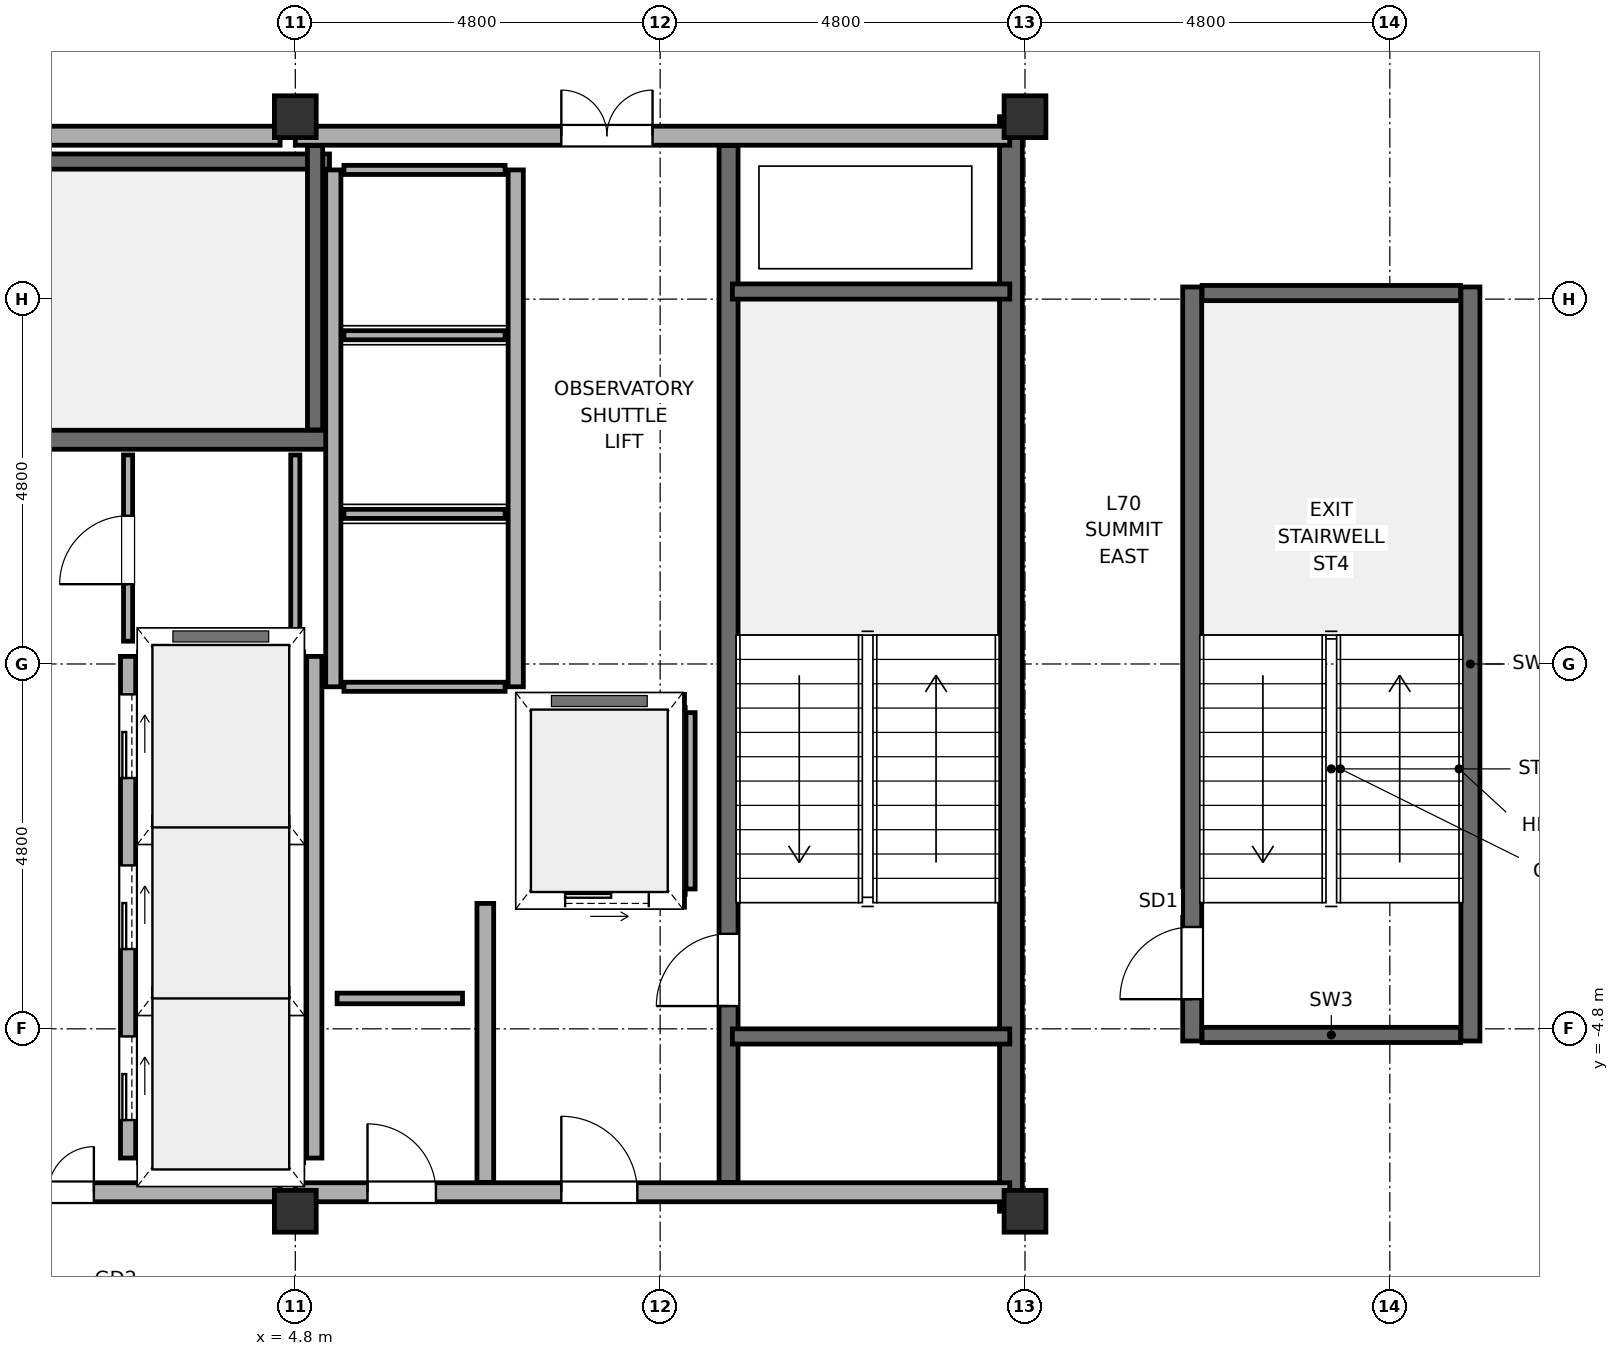
"""IFC4 building model, lengths in metres.
Left out: names, types, materials, properties, quantities, classifications, styles, units other than length and angle.
Written with IfcOpenShell. Run it as: python <this file> out.ifc"""

import sys

from ifc_helpers import new_model, si_unit, direction, frame, frame_2d, origin, origin_2d, place, context, subcontext, project, spatial, rectangle, hollow_rectangle, extrude, element, fill, save


model = new_model("IFC4")
c1 = context("Model", 3, precision=1e-05, world=origin(), true_north=direction((0.0, 1.0)))
c2 = subcontext(c1, "Body", "Model", "MODEL_VIEW")
j1 = project(units=[si_unit("LENGTHUNIT", "METRE"), si_unit("PLANEANGLEUNIT", "RADIAN")], contexts=[c1])
p1 = place(None, origin())
s1 = spatial("IfcSite", under=j1, at=p1, CompositionType="ELEMENT")
p2 = place(p1, origin())
s2 = spatial("IfcBuilding", under=s1, at=p2, CompositionType="ELEMENT")
p3 = place(p2, frame((0.0, 0.0, 282.2)))
s3 = spatial("IfcBuildingStorey", under=s2, at=p3, CompositionType="ELEMENT", Elevation=282.2)
for number, where, z_axis, x_axis in (
    (1, (4.8, -7.2, 0.0), (0.0, 0.0, 1.0), (1.0, 0.0, 0.0)),
    (2, (4.8, 7.2, 0.0), (0.0, 0.0, 1.0), (1.0, 0.0, 0.0)),
    (3, (14.4, -7.2, 0.0), (0.0, 0.0, 1.0), (1.0, 0.0, 0.0)),
    (4, (14.4, 7.2, 0.0), (0.0, 0.0, 1.0), (1.0, 0.0, 0.0)),
):
    element("IfcColumn", number, at=place(p3, frame(where, z_axis=z_axis, x_axis=x_axis)), inside=s3, PredefinedType="COLUMN", context=c2, shape_type="SweptSolid", body=[
        extrude(hollow_rectangle(XDim=0.55, YDim=0.55, WallThickness=0.025, at=origin_2d()), origin(), (0.0, 0.0, 1.0), 4.2),
    ])
p4 = place(p3, frame((14.215, -7.2, -0.2), z_axis=(0.0, 0.0, 1.0), x_axis=(0.0, 1.0, 0.0)))
e5 = element("IfcWall", 5, at=p4, inside=s3, PredefinedType="SHEAR", context=c2, shape_type="SweptSolid", body=[
    extrude(rectangle(XDim=14.4, YDim=0.3, at=frame_2d((7.2, 0.0))), origin(), (0.0, 0.0, 1.0), 4.2),
])
p5 = place(p3, frame((-4.6, -6.95, 0.0), z_axis=(0.0, 0.0, 1.0), x_axis=(1.0, 0.0, 0.0)))
e6 = element("IfcWall", 6, at=p5, inside=s3, PredefinedType="SOLIDWALL", context=c2, shape_type="SweptSolid", body=[
    extrude(rectangle(XDim=9.2, YDim=0.25, at=frame_2d((4.6, 0.0))), origin(), (0.0, 0.0, 1.0), 2.8),
])
p6 = place(p5, frame((0.8, 0.0, 0.0)))
e7 = element("IfcOpeningElement", 7, at=p6, cuts=e6, PredefinedType="OPENING", context=c2, shape_type="SweptSolid", body=[
    extrude(rectangle(XDim=1.2, YDim=2.2, at=frame_2d((0.6, 1.1))), frame((0.0, 0.14, 0.0), z_axis=(0.0, -1.0, 0.0), x_axis=(1.0, 0.0, 0.0)), (0.0, 0.0, 1.0), 0.28),
])
p7 = place(p5, frame((5.55, 0.0, 0.0)))
e8 = element("IfcOpeningElement", 8, at=p7, cuts=e6, PredefinedType="OPENING", context=c2, shape_type="SweptSolid", body=[
    extrude(rectangle(XDim=1.2, YDim=2.2, at=frame_2d((0.6, 1.1))), frame((0.0, 0.14, 0.0), z_axis=(0.0, -1.0, 0.0), x_axis=(1.0, 0.0, 0.0)), (0.0, 0.0, 1.0), 0.28),
])
p8 = place(p3, frame((4.8, -6.95, 0.0), z_axis=(0.0, 0.0, 1.0), x_axis=(1.0, 0.0, 0.0)))
e9 = element("IfcWall", 9, at=p8, inside=s3, PredefinedType="SOLIDWALL", context=c2, shape_type="SweptSolid", body=[
    extrude(rectangle(XDim=9.4, YDim=0.25, at=frame_2d((4.7, 0.0))), origin(), (0.0, 0.0, 1.0), 2.6),
])
p9 = place(p8, frame((3.5, 0.0, 0.0)))
e10 = element("IfcOpeningElement", 10, at=p9, cuts=e9, PredefinedType="OPENING", context=c2, shape_type="SweptSolid", body=[
    extrude(rectangle(XDim=1.0, YDim=2.15, at=frame_2d((0.5, 1.075))), frame((0.0, 0.14, 0.0), z_axis=(0.0, -1.0, 0.0), x_axis=(1.0, 0.0, 0.0)), (0.0, 0.0, 1.0), 0.28),
])
p10 = place(p8, frame((0.95, 0.0, 0.0)))
e11 = element("IfcOpeningElement", 11, at=p10, cuts=e9, PredefinedType="OPENING", context=c2, shape_type="SweptSolid", body=[
    extrude(rectangle(XDim=0.9, YDim=2.1, at=frame_2d((0.45, 1.05))), frame((0.0, 0.14, 0.0), z_axis=(0.0, -1.0, 0.0), x_axis=(1.0, 0.0, 0.0)), (0.0, 0.0, 1.0), 0.28),
])
p11 = place(p3, frame((-4.6, 6.95, 0.0), z_axis=(0.0, 0.0, 1.0), x_axis=(1.0, 0.0, 0.0)))
e12 = element("IfcWall", 12, at=p11, inside=s3, PredefinedType="SOLIDWALL", context=c2, shape_type="SweptSolid", body=[
    extrude(rectangle(XDim=9.2, YDim=0.25, at=frame_2d((4.6, 0.0))), origin(), (0.0, 0.0, 1.0), 2.6),
])
p12 = place(p3, frame((4.8, 6.95, 0.0), z_axis=(0.0, 0.0, 1.0), x_axis=(1.0, 0.0, 0.0)))
e13 = element("IfcWall", 13, at=p12, inside=s3, PredefinedType="SOLIDWALL", context=c2, shape_type="SweptSolid", body=[
    extrude(rectangle(XDim=9.4, YDim=0.25, at=frame_2d((4.7, 0.0))), origin(), (0.0, 0.0, 1.0), 2.6),
])
p13 = place(p12, frame((3.5, 0.0, 0.0)))
e14 = element("IfcOpeningElement", 14, at=p13, cuts=e13, PredefinedType="OPENING", context=c2, shape_type="SweptSolid", body=[
    extrude(rectangle(XDim=1.2, YDim=2.2, at=frame_2d((0.6, 1.1))), frame((0.0, 0.14, 0.0), z_axis=(0.0, -1.0, 0.0), x_axis=(1.0, 0.0, 0.0)), (0.0, 0.0, 1.0), 0.28),
])
p14 = place(p3, frame((7.3, -6.82, 0.0), z_axis=(0.0, 0.0, 1.0), x_axis=(0.0, 1.0, 0.0)))
e15 = element("IfcWall", 15, at=p14, inside=s3, PredefinedType="SOLIDWALL", context=c2, shape_type="SweptSolid", body=[
    extrude(rectangle(XDim=3.67, YDim=0.22, at=frame_2d((1.835, 0.0))), origin(), (0.0, 0.0, 1.0), 2.6),
])
p15 = place(p3, frame((10.5, -6.82, -0.2), z_axis=(0.0, 0.0, 1.0), x_axis=(0.0, 1.0, 0.0)))
e16 = element("IfcWall", 16, at=p15, inside=s3, PredefinedType="SOLIDWALL", context=c2, shape_type="SweptSolid", body=[
    extrude(rectangle(XDim=13.64, YDim=0.25, at=frame_2d((6.82, 0.0))), origin(), (0.0, 0.0, 1.0), 4.2),
])
p16 = place(p15, frame((2.32, 0.0, 0.2)))
e17 = element("IfcOpeningElement", 17, at=p16, cuts=e16, PredefinedType="OPENING", context=c2, shape_type="SweptSolid", body=[
    extrude(rectangle(XDim=0.95, YDim=2.15, at=frame_2d((0.475, 1.075))), frame((0.0, 0.14, 0.0), z_axis=(0.0, -1.0, 0.0), x_axis=(1.0, 0.0, 0.0)), (0.0, 0.0, 1.0), 0.28),
])
for number, where, z_axis, x_axis in (
    (18, (10.55, -4.9, -0.2), (0.0, 0.0, 1.0), (1.0, 0.0, 0.0)),
    (19, (10.55, 4.9, -0.2), (0.0, 0.0, 1.0), (1.0, 0.0, 0.0)),
):
    element("IfcWall", number, at=place(p3, frame(where, z_axis=z_axis, x_axis=x_axis)), inside=s3, PredefinedType="SOLIDWALL", context=c2, shape_type="SweptSolid", body=[
        extrude(rectangle(XDim=3.65, YDim=0.2, at=frame_2d((1.825, 0.0))), origin(), (0.0, 0.0, 1.0), 4.2),
    ])
p17 = place(p3, frame((-4.65, 2.95, -0.2), z_axis=(0.0, 0.0, 1.0), x_axis=(1.0, 0.0, 0.0)))
e20 = element("IfcWall", 20, at=p17, inside=s3, PredefinedType="SOLIDWALL", context=c2, shape_type="SweptSolid", body=[
    extrude(rectangle(XDim=9.9, YDim=0.25, at=frame_2d((4.95, 0.0))), origin(), (0.0, 0.0, 1.0), 4.2),
])
p18 = place(p17, frame((0.65, 0.0, 0.2)))
e21 = element("IfcOpeningElement", 21, at=p18, cuts=e20, PredefinedType="OPENING", context=c2, shape_type="SweptSolid", body=[
    extrude(rectangle(XDim=0.95, YDim=2.15, at=frame_2d((0.475, 1.075))), frame((0.0, 0.14, 0.0), z_axis=(0.0, -1.0, 0.0), x_axis=(1.0, 0.0, 0.0)), (0.0, 0.0, 1.0), 0.28),
])
p19 = place(p3, frame((-4.65, 6.61, -0.2), z_axis=(0.0, 0.0, 1.0), x_axis=(1.0, 0.0, 0.0)))
e22 = element("IfcWall", 22, at=p19, inside=s3, PredefinedType="SOLIDWALL", context=c2, shape_type="SweptSolid", body=[
    extrude(rectangle(XDim=9.9, YDim=0.2, at=frame_2d((4.95, 0.0))), origin(), (0.0, 0.0, 1.0), 4.2),
])
p20 = place(p3, frame((5.06, 3.08, -0.2), z_axis=(0.0, 0.0, 1.0), x_axis=(0.0, 1.0, 0.0)))
e23 = element("IfcWall", 23, at=p20, inside=s3, PredefinedType="SOLIDWALL", context=c2, shape_type="SweptSolid", body=[
    extrude(rectangle(XDim=3.74, YDim=0.2, at=frame_2d((1.87, 0.0))), origin(), (0.0, 0.0, 1.0), 4.2),
])
p21 = place(p3, frame((20.26, -4.96, -0.2), z_axis=(0.0, 0.0, 1.0), x_axis=(0.0, 1.0, 0.0)))
e24 = element("IfcWall", 24, at=p21, inside=s3, PredefinedType="SOLIDWALL", context=c2, shape_type="SweptSolid", body=[
    extrude(rectangle(XDim=9.92, YDim=0.25, at=frame_2d((4.96, 0.0))), origin(), (0.0, 0.0, 1.0), 4.2),
])
p22 = place(p3, frame((16.6, -4.96, -0.2), z_axis=(0.0, 0.0, 1.0), x_axis=(0.0, 1.0, 0.0)))
e25 = element("IfcWall", 25, at=p22, inside=s3, PredefinedType="SOLIDWALL", context=c2, shape_type="SweptSolid", body=[
    extrude(rectangle(XDim=9.92, YDim=0.25, at=frame_2d((4.96, 0.0))), origin(), (0.0, 0.0, 1.0), 4.2),
])
p23 = place(p22, frame((0.55, 0.0, 0.2)))
e26 = element("IfcOpeningElement", 26, at=p23, cuts=e25, PredefinedType="OPENING", context=c2, shape_type="SweptSolid", body=[
    extrude(rectangle(XDim=0.95, YDim=2.15, at=frame_2d((0.475, 1.075))), frame((0.0, 0.14, 0.0), z_axis=(0.0, -1.0, 0.0), x_axis=(1.0, 0.0, 0.0)), (0.0, 0.0, 1.0), 0.28),
])
for number, where, z_axis, x_axis in (
    (27, (16.73, -4.88, -0.2), (0.0, 0.0, 1.0), (1.0, 0.0, 0.0)),
    (28, (16.73, 4.88, -0.2), (0.0, 0.0, 1.0), (1.0, 0.0, 0.0)),
):
    element("IfcWall", number, at=place(p3, frame(where, z_axis=z_axis, x_axis=x_axis)), inside=s3, PredefinedType="SOLIDWALL", context=c2, shape_type="SweptSolid", body=[
        extrude(rectangle(XDim=3.4, YDim=0.2, at=frame_2d((1.7, 0.0))), origin(), (0.0, 0.0, 1.0), 4.2),
    ])
p24 = place(p3, frame((2.6, -6.5, 0.0), z_axis=(0.0, 0.0, 1.0), x_axis=(0.0, 1.0, 0.0)))
e29 = element("IfcWall", 29, at=p24, inside=s3, PredefinedType="SOLIDWALL", context=c2, shape_type="SweptSolid", body=[
    extrude(rectangle(XDim=6.6, YDim=0.2, at=frame_2d((3.3, 0.0))), origin(), (0.0, 0.0, 1.0), 4.0),
])
p25 = place(p24, frame((0.5, 0.0, 0.0)))
e30 = element("IfcOpeningElement", 30, at=p25, cuts=e29, PredefinedType="OPENING", context=c2, shape_type="SweptSolid", body=[
    extrude(rectangle(XDim=1.1, YDim=2.2, at=frame_2d((0.55, 1.1))), frame((0.0, 0.115, 0.0), z_axis=(0.0, -1.0, 0.0), x_axis=(1.0, 0.0, 0.0)), (0.0, 0.0, 1.0), 0.23),
])
p26 = place(p24, frame((2.75, 0.0, 0.0)))
e31 = element("IfcOpeningElement", 31, at=p26, cuts=e29, PredefinedType="OPENING", context=c2, shape_type="SweptSolid", body=[
    extrude(rectangle(XDim=1.1, YDim=2.2, at=frame_2d((0.55, 1.1))), frame((0.0, 0.115, 0.0), z_axis=(0.0, -1.0, 0.0), x_axis=(1.0, 0.0, 0.0)), (0.0, 0.0, 1.0), 0.23),
])
p27 = place(p24, frame((5.0, 0.0, 0.0)))
e32 = element("IfcOpeningElement", 32, at=p27, cuts=e29, PredefinedType="OPENING", context=c2, shape_type="SweptSolid", body=[
    extrude(rectangle(XDim=1.1, YDim=2.2, at=frame_2d((0.55, 1.1))), frame((0.0, 0.115, 0.0), z_axis=(0.0, -1.0, 0.0), x_axis=(1.0, 0.0, 0.0)), (0.0, 0.0, 1.0), 0.23),
])
p28 = place(p3, frame((5.05, -6.5, 0.0), z_axis=(0.0, 0.0, 1.0), x_axis=(0.0, 1.0, 0.0)))
e33 = element("IfcWall", 33, at=p28, inside=s3, PredefinedType="SOLIDWALL", context=c2, shape_type="SweptSolid", body=[
    extrude(rectangle(XDim=6.6, YDim=0.2, at=frame_2d((3.3, 0.0))), origin(), (0.0, 0.0, 1.0), 4.0),
])
for number, where, z_axis, x_axis in (
    (34, (2.74, -6.5, 0.0), (0.0, 0.0, 1.0), (1.0, 0.0, 0.0)),
    (35, (2.74, -4.325, 0.0), (0.0, 0.0, 1.0), (1.0, 0.0, 0.0)),
    (36, (2.74, -2.075, 0.0), (0.0, 0.0, 1.0), (1.0, 0.0, 0.0)),
    (37, (2.74, 0.1, 0.0), (0.0, 0.0, 1.0), (1.0, 0.0, 0.0)),
):
    element("IfcWall", number, at=place(p3, frame(where, z_axis=z_axis, x_axis=x_axis)), inside=s3, PredefinedType="PARTITIONING", context=c2, shape_type="SweptSolid", body=[
        extrude(rectangle(XDim=2.17, YDim=0.12, at=frame_2d((1.085, 0.0))), origin(), (0.0, 0.0, 1.0), 4.0),
    ])
for number, where, z_axis, x_axis in (
    (38, (7.7, -0.3, 0.0), (0.0, 0.0, 1.0), (0.0, 1.0, 0.0)),
    (39, (5.3, -0.3, 0.0), (0.0, 0.0, 1.0), (0.0, 1.0, 0.0)),
):
    element("IfcWall", number, at=place(p3, frame(where, z_axis=z_axis, x_axis=x_axis)), inside=s3, PredefinedType="SOLIDWALL", context=c2, shape_type="SweptSolid", body=[
        extrude(rectangle(XDim=6.8, YDim=0.2, at=frame_2d((3.4, 0.0))), origin(), (0.0, 0.0, 1.0), 4.0),
    ])
for number, where, z_axis, x_axis in (
    (40, (5.44, -0.3, 0.0), (0.0, 0.0, 1.0), (1.0, 0.0, 0.0)),
    (41, (5.44, 1.975, 0.0), (0.0, 0.0, 1.0), (1.0, 0.0, 0.0)),
    (42, (5.44, 4.325, 0.0), (0.0, 0.0, 1.0), (1.0, 0.0, 0.0)),
    (43, (5.44, 6.5, 0.0), (0.0, 0.0, 1.0), (1.0, 0.0, 0.0)),
):
    element("IfcWall", number, at=place(p3, frame(where, z_axis=z_axis, x_axis=x_axis)), inside=s3, PredefinedType="PARTITIONING", context=c2, shape_type="SweptSolid", body=[
        extrude(rectangle(XDim=2.12, YDim=0.12, at=frame_2d((1.06, 0.0))), origin(), (0.0, 0.0, 1.0), 4.0),
    ])
p29 = place(p3, frame((7.88, -3.1, 0.0), z_axis=(0.0, 0.0, 1.0), x_axis=(1.0, 0.0, 0.0)))
e44 = element("IfcWall", 44, at=p29, inside=s3, PredefinedType="SOLIDWALL", context=c2, shape_type="SweptSolid", body=[
    extrude(rectangle(XDim=2.04, YDim=0.2, at=frame_2d((1.02, 0.0))), origin(), (0.0, 0.0, 1.0), 4.0),
])
p30 = place(p29, frame((0.47, 0.0, 0.0)))
e45 = element("IfcOpeningElement", 45, at=p30, cuts=e44, PredefinedType="OPENING", context=c2, shape_type="SweptSolid", body=[
    extrude(rectangle(XDim=1.1, YDim=2.2, at=frame_2d((0.55, 1.1))), frame((0.0, 0.115, 0.0), z_axis=(0.0, -1.0, 0.0), x_axis=(1.0, 0.0, 0.0)), (0.0, 0.0, 1.0), 0.23),
])
p31 = place(p3, frame((7.88, -0.5, 0.0), z_axis=(0.0, 0.0, 1.0), x_axis=(1.0, 0.0, 0.0)))
e46 = element("IfcWall", 46, at=p31, inside=s3, PredefinedType="SOLIDWALL", context=c2, shape_type="SweptSolid", body=[
    extrude(rectangle(XDim=2.04, YDim=0.2, at=frame_2d((1.02, 0.0))), origin(), (0.0, 0.0, 1.0), 4.0),
])
for number, where, z_axis, x_axis in (
    (47, (7.8, -2.96, 0.0), (0.0, 0.0, 1.0), (0.0, 1.0, 0.0)),
    (48, (10.0, -2.96, 0.0), (0.0, 0.0, 1.0), (0.0, 1.0, 0.0)),
):
    element("IfcWall", number, at=place(p3, frame(where, z_axis=z_axis, x_axis=x_axis)), inside=s3, PredefinedType="PARTITIONING", context=c2, shape_type="SweptSolid", body=[
        extrude(rectangle(XDim=2.32, YDim=0.12, at=frame_2d((1.16, 0.0))), origin(), (0.0, 0.0, 1.0), 4.0),
    ])
p32 = place(p3, frame((5.35, -4.4, 0.0), z_axis=(0.0, 0.0, 1.0), x_axis=(1.0, 0.0, 0.0)))
e49 = element("IfcWall", 49, at=p32, inside=s3, PredefinedType="PLUMBINGWALL", context=c2, shape_type="SweptSolid", body=[
    extrude(rectangle(XDim=1.65, YDim=0.14, at=frame_2d((0.825, 0.0))), origin(), (0.0, 0.0, 1.0), 4.0),
])
p33 = place(p3, frame((2.6, 0.3, 0.0), z_axis=(0.0, 0.0, 1.0), x_axis=(0.0, 1.0, 0.0)))
e50 = element("IfcWall", 50, at=p33, inside=s3, PredefinedType="PARTITIONING", context=c2, shape_type="SweptSolid", body=[
    extrude(rectangle(XDim=2.45, YDim=0.12, at=frame_2d((1.225, 0.0))), origin(), (0.0, 0.0, 1.0), 4.0),
])
p34 = place(p33, frame((0.75, 0.0, 0.0)))
e51 = element("IfcOpeningElement", 51, at=p34, cuts=e50, PredefinedType="OPENING", context=c2, shape_type="SweptSolid", body=[
    extrude(rectangle(XDim=0.9, YDim=2.1, at=frame_2d((0.45, 1.05))), frame((0.0, 0.075, 0.0), z_axis=(0.0, -1.0, 0.0), x_axis=(1.0, 0.0, 0.0)), (0.0, 0.0, 1.0), 0.15),
])
p35 = place(p3, frame((4.8, 0.3, 0.0), z_axis=(0.0, 0.0, 1.0), x_axis=(0.0, 1.0, 0.0)))
e52 = element("IfcWall", 52, at=p35, inside=s3, PredefinedType="PARTITIONING", context=c2, shape_type="SweptSolid", body=[
    extrude(rectangle(XDim=2.45, YDim=0.12, at=frame_2d((1.225, 0.0))), origin(), (0.0, 0.0, 1.0), 4.0),
])
p36 = place(p9, origin())
e53 = element("IfcDoor", 53, at=p36, inside=s3, OperationType="SINGLE_SWING_LEFT", PredefinedType="DOOR", context=c2, shape_type="SweptSolid", body=[
    extrude(rectangle(XDim=1.0, YDim=2.15, at=frame_2d((0.5, 1.075))), frame((0.0, 0.025, 0.0), z_axis=(0.0, -1.0, 0.0), x_axis=(1.0, 0.0, 0.0)), (0.0, 0.0, 1.0), 0.05),
])
fill(e10, e53)
p37 = place(p7, origin())
e54 = element("IfcDoor", 54, at=p37, inside=s3, OperationType="DOUBLE_DOOR_SINGLE_SWING", PredefinedType="DOOR", context=c2, shape_type="SweptSolid", body=[
    extrude(rectangle(XDim=1.2, YDim=2.2, at=frame_2d((0.6, 1.1))), frame((0.0, 0.025, 0.0), z_axis=(0.0, -1.0, 0.0), x_axis=(1.0, 0.0, 0.0)), (0.0, 0.0, 1.0), 0.05),
])
fill(e8, e54)
p38 = place(p13, origin())
e55 = element("IfcDoor", 55, at=p38, inside=s3, OperationType="DOUBLE_DOOR_SINGLE_SWING", PredefinedType="DOOR", context=c2, shape_type="SweptSolid", body=[
    extrude(rectangle(XDim=1.2, YDim=2.2, at=frame_2d((0.6, 1.1))), frame((0.0, 0.025, 0.0), z_axis=(0.0, -1.0, 0.0), x_axis=(1.0, 0.0, 0.0)), (0.0, 0.0, 1.0), 0.05),
])
fill(e14, e55)
p39 = place(p16, origin())
e56 = element("IfcDoor", 56, at=p39, inside=s3, OperationType="SINGLE_SWING_LEFT", PredefinedType="DOOR", context=c2, shape_type="SweptSolid", body=[
    extrude(rectangle(XDim=0.95, YDim=2.15, at=frame_2d((0.475, 1.075))), frame((0.0, 0.025, 0.0), z_axis=(0.0, -1.0, 0.0), x_axis=(1.0, 0.0, 0.0)), (0.0, 0.0, 1.0), 0.05),
])
fill(e17, e56)
p40 = place(p23, origin())
e57 = element("IfcDoor", 57, at=p40, inside=s3, OperationType="SINGLE_SWING_LEFT", PredefinedType="DOOR", context=c2, shape_type="SweptSolid", body=[
    extrude(rectangle(XDim=0.95, YDim=2.15, at=frame_2d((0.475, 1.075))), frame((0.0, 0.025, 0.0), z_axis=(0.0, -1.0, 0.0), x_axis=(1.0, 0.0, 0.0)), (0.0, 0.0, 1.0), 0.05),
])
fill(e26, e57)
p41 = place(p25, origin())
e58 = element("IfcDoor", 58, at=p41, inside=s3, OperationType="SLIDING_TO_LEFT", PredefinedType="DOOR", context=c2, shape_type="SweptSolid", body=[
    extrude(rectangle(XDim=1.1, YDim=2.2, at=frame_2d((0.55, 1.1))), frame((0.0, 0.025, 0.0), z_axis=(0.0, -1.0, 0.0), x_axis=(1.0, 0.0, 0.0)), (0.0, 0.0, 1.0), 0.05),
])
fill(e30, e58)
p42 = place(p26, origin())
e59 = element("IfcDoor", 59, at=p42, inside=s3, OperationType="SLIDING_TO_LEFT", PredefinedType="DOOR", context=c2, shape_type="SweptSolid", body=[
    extrude(rectangle(XDim=1.1, YDim=2.2, at=frame_2d((0.55, 1.1))), frame((0.0, 0.025, 0.0), z_axis=(0.0, -1.0, 0.0), x_axis=(1.0, 0.0, 0.0)), (0.0, 0.0, 1.0), 0.05),
])
fill(e31, e59)
p43 = place(p27, origin())
e60 = element("IfcDoor", 60, at=p43, inside=s3, OperationType="SLIDING_TO_LEFT", PredefinedType="DOOR", context=c2, shape_type="SweptSolid", body=[
    extrude(rectangle(XDim=1.1, YDim=2.2, at=frame_2d((0.55, 1.1))), frame((0.0, 0.025, 0.0), z_axis=(0.0, -1.0, 0.0), x_axis=(1.0, 0.0, 0.0)), (0.0, 0.0, 1.0), 0.05),
])
fill(e32, e60)
p44 = place(p30, origin())
e61 = element("IfcDoor", 61, at=p44, inside=s3, OperationType="SLIDING_TO_LEFT", PredefinedType="DOOR", context=c2, shape_type="SweptSolid", body=[
    extrude(rectangle(XDim=1.1, YDim=2.2, at=frame_2d((0.55, 1.1))), frame((0.0, 0.025, 0.0), z_axis=(0.0, -1.0, 0.0), x_axis=(1.0, 0.0, 0.0)), (0.0, 0.0, 1.0), 0.05),
])
fill(e45, e61)
p45 = place(p34, origin())
e62 = element("IfcDoor", 62, at=p45, inside=s3, OperationType="SINGLE_SWING_LEFT", PredefinedType="DOOR", context=c2, shape_type="SweptSolid", body=[
    extrude(rectangle(XDim=0.9, YDim=2.1, at=frame_2d((0.45, 1.05))), frame((0.0, 0.025, 0.0), z_axis=(0.0, -1.0, 0.0), x_axis=(1.0, 0.0, 0.0)), (0.0, 0.0, 1.0), 0.05),
])
fill(e51, e62)
p46 = place(p10, origin())
e63 = element("IfcDoor", 63, at=p46, inside=s3, OperationType="SINGLE_SWING_RIGHT", PredefinedType="DOOR", context=c2, shape_type="SweptSolid", body=[
    extrude(rectangle(XDim=0.9, YDim=2.1, at=frame_2d((0.45, 1.05))), frame((0.0, 0.025, 0.0), z_axis=(0.0, -1.0, 0.0), x_axis=(1.0, 0.0, 0.0)), (0.0, 0.0, 1.0), 0.05),
])
fill(e11, e63)
save(model, sys.argv[1])
